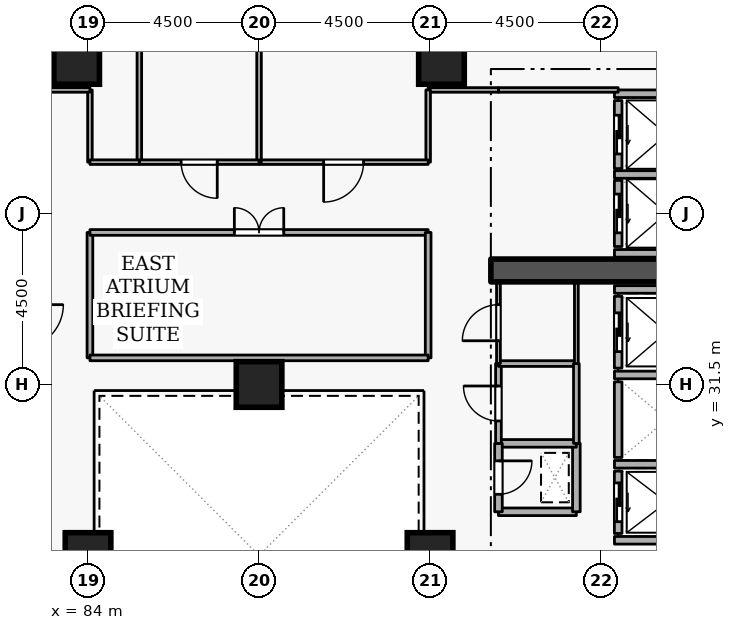
"""IFC4 building model, lengths in metres.
Left out: names, types, materials, properties, quantities, classifications, styles, units other than length and angle.
Written with IfcOpenShell. Run it as: python <this file> out.ifc"""

import sys

from ifc_helpers import new_model, si_unit, direction, frame, frame_2d, origin, origin_2d, place, context, subcontext, project, spatial, rectangle, extrude, element, fill, save


model = new_model("IFC4")
c1 = context("Model", 3, precision=1e-05, world=origin(), true_north=direction((0.0, 1.0)))
c2 = subcontext(c1, "Body", "Model", "MODEL_VIEW")
j1 = project(units=[si_unit("LENGTHUNIT", "METRE"), si_unit("PLANEANGLEUNIT", "RADIAN")], contexts=[c1])
p1 = place(None, origin())
s1 = spatial("IfcSite", under=j1, at=p1, CompositionType="ELEMENT")
p2 = place(p1, origin())
s2 = spatial("IfcBuilding", under=s1, at=p2, CompositionType="ELEMENT")
p3 = place(p2, frame((0.0, 0.0, 94.5)))
s3 = spatial("IfcBuildingStorey", under=s2, at=p3, CompositionType="ELEMENT", Elevation=94.5)
p4 = place(p3, frame((94.6, 34.5, 0.0), z_axis=(0.0, 0.0, 1.0), x_axis=(1.0, 0.0, 0.0)))
e1 = element("IfcWall", 1, at=p4, inside=s3, PredefinedType="SHEAR", context=c2, shape_type="SweptSolid", body=[
    extrude(rectangle(XDim=5.7, YDim=0.6, at=frame_2d((2.85, 0.0))), origin(), (0.0, 0.0, 1.0), 3.6),
])
for number, where, z_axis, x_axis in (
    (2, (93.3, 40.0, 0.0), (0.0, 0.0, 1.0), (1.0, 0.0, 0.0)),
    (3, (83.7, 40.0, 0.0), (0.0, 0.0, 1.0), (1.0, 0.0, 0.0)),
    (4, (93.0, 27.0, 0.0), (0.0, 0.0, 1.0), (1.0, 0.0, 0.0)),
    (5, (84.0, 27.0, 0.0), (0.0, 0.0, 1.0), (1.0, 0.0, 0.0)),
    (6, (88.5, 31.5, 0.0), (0.0, 0.0, 1.0), (1.0, 0.0, 0.0)),
):
    element("IfcColumn", number, at=place(p3, frame(where, z_axis=z_axis, x_axis=x_axis)), inside=s3, PredefinedType="COLUMN", context=c2, shape_type="SweptSolid", body=[
        extrude(rectangle(XDim=1.2, YDim=1.2, at=origin_2d()), origin(), (0.0, 0.0, 1.0), 3.6),
    ])
p5 = place(p3, frame((97.95, 29.22, 0.0), z_axis=(0.0, 0.0, 1.0), x_axis=(0.0, -1.0, 0.0)))
e7 = element("IfcWall", 7, at=p5, inside=s3, PredefinedType="STANDARD", context=c2, shape_type="SweptSolid", body=[
    extrude(rectangle(XDim=1.64, YDim=0.2, at=frame_2d((0.82, 0.0))), origin(), (0.0, 0.0, 1.0), 3.3),
])
p6 = place(p5, frame((0.31, 0.0, 0.0)))
e8 = element("IfcOpeningElement", 8, at=p6, cuts=e7, PredefinedType="OPENING", context=c2, shape_type="SweptSolid", body=[
    extrude(rectangle(XDim=1.02, YDim=2.06, at=frame_2d((0.51, 1.03))), frame((0.0, 0.11, 0.0), z_axis=(0.0, -1.0, 0.0), x_axis=(1.0, 0.0, 0.0)), (0.0, 0.0, 1.0), 0.22),
])
p7 = place(p3, frame((97.95, 31.57, 0.0), z_axis=(0.0, 0.0, 1.0), x_axis=(0.0, -1.0, 0.0)))
e9 = element("IfcWall", 9, at=p7, inside=s3, PredefinedType="STANDARD", context=c2, shape_type="SweptSolid", body=[
    extrude(rectangle(XDim=1.99, YDim=0.2, at=frame_2d((0.995, 0.0))), origin(), (0.0, 0.0, 1.0), 3.3),
])
p8 = place(p3, frame((97.95, 33.82, 0.0), z_axis=(0.0, 0.0, 1.0), x_axis=(0.0, -1.0, 0.0)))
e10 = element("IfcWall", 10, at=p8, inside=s3, PredefinedType="STANDARD", context=c2, shape_type="SweptSolid", body=[
    extrude(rectangle(XDim=1.89, YDim=0.2, at=frame_2d((0.945, 0.0))), origin(), (0.0, 0.0, 1.0), 3.3),
])
p9 = place(p8, frame((0.435, 0.0, 0.0)))
e11 = element("IfcOpeningElement", 11, at=p9, cuts=e10, PredefinedType="OPENING", context=c2, shape_type="SweptSolid", body=[
    extrude(rectangle(XDim=1.02, YDim=2.06, at=frame_2d((0.51, 1.03))), frame((0.0, 0.11, 0.0), z_axis=(0.0, -1.0, 0.0), x_axis=(1.0, 0.0, 0.0)), (0.0, 0.0, 1.0), 0.22),
])
p10 = place(p3, frame((97.95, 36.87, 0.0), z_axis=(0.0, 0.0, 1.0), x_axis=(0.0, -1.0, 0.0)))
e12 = element("IfcWall", 12, at=p10, inside=s3, PredefinedType="STANDARD", context=c2, shape_type="SweptSolid", body=[
    extrude(rectangle(XDim=1.74, YDim=0.2, at=frame_2d((0.87, 0.0))), origin(), (0.0, 0.0, 1.0), 3.3),
])
p11 = place(p10, frame((0.36, 0.0, 0.0)))
e13 = element("IfcOpeningElement", 13, at=p11, cuts=e12, PredefinedType="OPENING", context=c2, shape_type="SweptSolid", body=[
    extrude(rectangle(XDim=1.02, YDim=2.06, at=frame_2d((0.51, 1.03))), frame((0.0, 0.11, 0.0), z_axis=(0.0, -1.0, 0.0), x_axis=(1.0, 0.0, 0.0)), (0.0, 0.0, 1.0), 0.22),
])
p12 = place(p3, frame((97.95, 38.97, 0.0), z_axis=(0.0, 0.0, 1.0), x_axis=(0.0, -1.0, 0.0)))
e14 = element("IfcWall", 14, at=p12, inside=s3, PredefinedType="STANDARD", context=c2, shape_type="SweptSolid", body=[
    extrude(rectangle(XDim=1.79, YDim=0.2, at=frame_2d((0.895, 0.0))), origin(), (0.0, 0.0, 1.0), 3.3),
])
p13 = place(p12, frame((0.385, 0.0, 0.0)))
e15 = element("IfcOpeningElement", 15, at=p13, cuts=e14, PredefinedType="OPENING", context=c2, shape_type="SweptSolid", body=[
    extrude(rectangle(XDim=1.02, YDim=2.06, at=frame_2d((0.51, 1.03))), frame((0.0, 0.11, 0.0), z_axis=(0.0, -1.0, 0.0), x_axis=(1.0, 0.0, 0.0)), (0.0, 0.0, 1.0), 0.22),
])
for number, where, z_axis, x_axis in (
    (16, (97.852, 29.4, 0.0), (0.0, 0.0, 1.0), (1.0, 0.0, 0.0)),
    (17, (97.852, 27.4, 0.0), (0.0, 0.0, 1.0), (1.0, 0.0, 0.0)),
    (18, (97.852, 31.75, 0.0), (0.0, 0.0, 1.0), (1.0, 0.0, 0.0)),
    (19, (97.852, 34.0, 0.0), (0.0, 0.0, 1.0), (1.0, 0.0, 0.0)),
):
    element("IfcWall", number, at=place(p3, frame(where, z_axis=z_axis, x_axis=x_axis)), inside=s3, PredefinedType="STANDARD", context=c2, shape_type="SweptSolid", body=[
        extrude(rectangle(XDim=2.436, YDim=0.2, at=frame_2d((1.218, 0.0))), origin(), (0.0, 0.0, 1.0), 3.3),
    ])
for number, where, z_axis, x_axis in (
    (20, (97.852, 37.025, 0.0), (0.0, 0.0, 1.0), (1.0, 0.0, 0.0)),
    (21, (97.852, 34.95, 0.0), (0.0, 0.0, 1.0), (1.0, 0.0, 0.0)),
):
    element("IfcWall", number, at=place(p3, frame(where, z_axis=z_axis, x_axis=x_axis)), inside=s3, PredefinedType="STANDARD", context=c2, shape_type="SweptSolid", body=[
        extrude(rectangle(XDim=2.746, YDim=0.2, at=frame_2d((1.373, 0.0))), origin(), (0.0, 0.0, 1.0), 3.3),
    ])
p14 = place(p3, frame((97.852, 39.15, 0.0), z_axis=(0.0, 0.0, 1.0), x_axis=(1.0, 0.0, 0.0)))
e22 = element("IfcWall", 22, at=p14, inside=s3, PredefinedType="STANDARD", context=c2, shape_type="SweptSolid", body=[
    extrude(rectangle(XDim=2.636, YDim=0.2, at=frame_2d((1.318, 0.0))), origin(), (0.0, 0.0, 1.0), 3.3),
])
p15 = place(p3, frame((94.8, 28.15, 0.0), z_axis=(0.0, 0.0, 1.0), x_axis=(1.0, 0.0, 0.0)))
e23 = element("IfcWall", 23, at=p15, inside=s3, PredefinedType="STANDARD", context=c2, shape_type="SweptSolid", body=[
    extrude(rectangle(XDim=2.05, YDim=0.2, at=frame_2d((1.025, 0.0))), origin(), (0.0, 0.0, 1.0), 3.3),
])
p16 = place(p3, frame((96.85, 28.15, 0.0), z_axis=(0.0, 0.0, 1.0), x_axis=(0.0, 1.0, 0.0)))
e24 = element("IfcWall", 24, at=p16, inside=s3, PredefinedType="STANDARD", context=c2, shape_type="SweptSolid", body=[
    extrude(rectangle(XDim=1.8, YDim=0.2, at=frame_2d((0.9, 0.0))), origin(), (0.0, 0.0, 1.0), 3.3),
])
p17 = place(p3, frame((96.85, 29.95, 0.0), z_axis=(0.0, 0.0, 1.0), x_axis=(-1.0, 0.0, 0.0)))
e25 = element("IfcWall", 25, at=p17, inside=s3, PredefinedType="STANDARD", context=c2, shape_type="SweptSolid", body=[
    extrude(rectangle(XDim=2.05, YDim=0.2, at=frame_2d((1.025, 0.0))), origin(), (0.0, 0.0, 1.0), 3.3),
])
p18 = place(p3, frame((94.8, 29.95, 0.0), z_axis=(0.0, 0.0, 1.0), x_axis=(0.0, -1.0, 0.0)))
e26 = element("IfcWall", 26, at=p18, inside=s3, PredefinedType="STANDARD", context=c2, shape_type="SweptSolid", body=[
    extrude(rectangle(XDim=1.8, YDim=0.2, at=frame_2d((0.9, 0.0))), origin(), (0.0, 0.0, 1.0), 3.3),
])
p19 = place(p18, frame((0.46, 0.0, 0.0)))
e27 = element("IfcOpeningElement", 27, at=p19, cuts=e26, PredefinedType="OPENING", context=c2, shape_type="SweptSolid", body=[
    extrude(rectangle(XDim=0.88, YDim=2.04, at=frame_2d((0.44, 1.02))), frame((0.0, 0.11, 0.0), z_axis=(0.0, -1.0, 0.0), x_axis=(1.0, 0.0, 0.0)), (0.0, 0.0, 1.0), 0.22),
])
p20 = place(p3, frame((94.8, 29.95, 0.0), z_axis=(0.0, 0.0, 1.0), x_axis=(0.0, 1.0, 0.0)))
e28 = element("IfcWall", 28, at=p20, inside=s3, PredefinedType="PARTITIONING", context=c2, shape_type="SweptSolid", body=[
    extrude(rectangle(XDim=2.1, YDim=0.15, at=frame_2d((1.05, 0.0))), origin(), (0.0, 0.0, 1.0), 3.3),
])
p21 = place(p20, frame((0.59, 0.0, 0.0)))
e29 = element("IfcOpeningElement", 29, at=p21, cuts=e28, PredefinedType="OPENING", context=c2, shape_type="SweptSolid", body=[
    extrude(rectangle(XDim=0.92, YDim=2.08, at=frame_2d((0.46, 1.04))), frame((0.0, 0.085, 0.0), z_axis=(0.0, -1.0, 0.0), x_axis=(1.0, 0.0, 0.0)), (0.0, 0.0, 1.0), 0.17),
])
p22 = place(p3, frame((94.8, 32.05, 0.0), z_axis=(0.0, 0.0, 1.0), x_axis=(1.0, 0.0, 0.0)))
e30 = element("IfcWall", 30, at=p22, inside=s3, PredefinedType="PARTITIONING", context=c2, shape_type="SweptSolid", body=[
    extrude(rectangle(XDim=2.05, YDim=0.15, at=frame_2d((1.025, 0.0))), origin(), (0.0, 0.0, 1.0), 3.3),
])
p23 = place(p3, frame((96.85, 32.05, 0.0), z_axis=(0.0, 0.0, 1.0), x_axis=(0.0, -1.0, 0.0)))
e31 = element("IfcWall", 31, at=p23, inside=s3, PredefinedType="PARTITIONING", context=c2, shape_type="SweptSolid", body=[
    extrude(rectangle(XDim=2.1, YDim=0.15, at=frame_2d((1.05, 0.0))), origin(), (0.0, 0.0, 1.0), 3.3),
])
p24 = place(p3, frame((94.8, 32.05, 0.0), z_axis=(0.0, 0.0, 1.0), x_axis=(0.0, 1.0, 0.0)))
e32 = element("IfcWall", 32, at=p24, inside=s3, PredefinedType="PARTITIONING", context=c2, shape_type="SweptSolid", body=[
    extrude(rectangle(XDim=2.15, YDim=0.1, at=frame_2d((1.075, 0.0))), origin(), (0.0, 0.0, 1.0), 3.3),
])
p25 = place(p24, frame((0.6, 0.0, 0.0)))
e33 = element("IfcOpeningElement", 33, at=p25, cuts=e32, PredefinedType="OPENING", context=c2, shape_type="SweptSolid", body=[
    extrude(rectangle(XDim=0.95, YDim=2.1, at=frame_2d((0.475, 1.05))), frame((0.0, 0.06, 0.0), z_axis=(0.0, -1.0, 0.0), x_axis=(1.0, 0.0, 0.0)), (0.0, 0.0, 1.0), 0.12),
])
p26 = place(p3, frame((96.85, 34.2, 0.0), z_axis=(0.0, 0.0, 1.0), x_axis=(0.0, -1.0, 0.0)))
e34 = element("IfcWall", 34, at=p26, inside=s3, PredefinedType="PARTITIONING", context=c2, shape_type="SweptSolid", body=[
    extrude(rectangle(XDim=2.15, YDim=0.1, at=frame_2d((1.075, 0.0))), origin(), (0.0, 0.0, 1.0), 3.3),
])
p27 = place(p3, frame((97.95, 39.25, 0.0), z_axis=(0.0, 0.0, 1.0), x_axis=(-1.0, 0.0, 0.0)))
e35 = element("IfcWall", 35, at=p27, inside=s3, PredefinedType="PARTITIONING", context=c2, shape_type="SweptSolid", body=[
    extrude(rectangle(XDim=3.15, YDim=0.12, at=frame_2d((1.575, 0.0))), origin(), (0.0, 0.0, 1.0), 3.3),
])
p28 = place(p3, frame((94.8, 39.25, 0.0), z_axis=(0.0, 0.0, 1.0), x_axis=(-1.0, 0.0, 0.0)))
e36 = element("IfcWall", 36, at=p28, inside=s3, PredefinedType="PARTITIONING", context=c2, shape_type="SweptSolid", body=[
    extrude(rectangle(XDim=1.85, YDim=0.12, at=frame_2d((0.925, 0.0))), origin(), (0.0, 0.0, 1.0), 3.3),
])
p29 = place(p3, frame((92.95, 39.25, 0.0), z_axis=(0.0, 0.0, 1.0), x_axis=(0.0, -1.0, 0.0)))
e37 = element("IfcWall", 37, at=p29, inside=s3, PredefinedType="PARTITIONING", context=c2, shape_type="SweptSolid", body=[
    extrude(rectangle(XDim=1.9, YDim=0.12, at=frame_2d((0.95, 0.0))), origin(), (0.0, 0.0, 1.0), 3.3),
])
p30 = place(p3, frame((92.95, 37.35, 0.0), z_axis=(0.0, 0.0, 1.0), x_axis=(-1.0, 0.0, 0.0)))
e38 = element("IfcWall", 38, at=p30, inside=s3, PredefinedType="PARTITIONING", context=c2, shape_type="SweptSolid", body=[
    extrude(rectangle(XDim=4.45, YDim=0.12, at=frame_2d((2.225, 0.0))), origin(), (0.0, 0.0, 1.0), 3.3),
])
p31 = place(p30, frame((1.7, 0.0, 0.0)))
e39 = element("IfcOpeningElement", 39, at=p31, cuts=e38, PredefinedType="OPENING", context=c2, shape_type="SweptSolid", body=[
    extrude(rectangle(XDim=1.05, YDim=2.1, at=frame_2d((0.525, 1.05))), frame((0.0, 0.07, 0.0), z_axis=(0.0, -1.0, 0.0), x_axis=(1.0, 0.0, 0.0)), (0.0, 0.0, 1.0), 0.14),
])
p32 = place(p3, frame((88.5, 37.35, 0.0), z_axis=(0.0, 0.0, 1.0), x_axis=(0.0, 1.0, 0.0)))
e40 = element("IfcWall", 40, at=p32, inside=s3, PredefinedType="PARTITIONING", context=c2, shape_type="SweptSolid", body=[
    extrude(rectangle(XDim=13.57, YDim=0.12, at=frame_2d((6.785, 0.0))), origin(), (0.0, 0.0, 1.0), 2.892),
])
p33 = place(p3, frame((85.35, 37.35, 0.0), z_axis=(0.0, 0.0, 1.0), x_axis=(0.0, 1.0, 0.0)))
e41 = element("IfcWall", 41, at=p33, inside=s3, PredefinedType="PARTITIONING", context=c2, shape_type="SweptSolid", body=[
    extrude(rectangle(XDim=13.57, YDim=0.12, at=frame_2d((6.785, 0.0))), origin(), (0.0, 0.0, 1.0), 3.3),
])
p34 = place(p3, frame((88.5, 37.35, 0.0), z_axis=(0.0, 0.0, 1.0), x_axis=(-1.0, 0.0, 0.0)))
e42 = element("IfcWall", 42, at=p34, inside=s3, PredefinedType="PARTITIONING", context=c2, shape_type="SweptSolid", body=[
    extrude(rectangle(XDim=3.15, YDim=0.12, at=frame_2d((1.575, 0.0))), origin(), (0.0, 0.0, 1.0), 3.3),
])
p35 = place(p34, frame((1.1, 0.0, 0.0)))
e43 = element("IfcOpeningElement", 43, at=p35, cuts=e42, PredefinedType="OPENING", context=c2, shape_type="SweptSolid", body=[
    extrude(rectangle(XDim=0.95, YDim=2.1, at=frame_2d((0.475, 1.05))), frame((0.0, 0.07, 0.0), z_axis=(0.0, -1.0, 0.0), x_axis=(1.0, 0.0, 0.0)), (0.0, 0.0, 1.0), 0.14),
])
p36 = place(p3, frame((84.05, 37.35, 0.0), z_axis=(0.0, 0.0, 1.0), x_axis=(0.0, 1.0, 0.0)))
e44 = element("IfcWall", 44, at=p36, inside=s3, PredefinedType="PARTITIONING", context=c2, shape_type="SweptSolid", body=[
    extrude(rectangle(XDim=1.9, YDim=0.12, at=frame_2d((0.95, 0.0))), origin(), (0.0, 0.0, 1.0), 3.3),
])
p37 = place(p3, frame((84.05, 39.25, 0.0), z_axis=(0.0, 0.0, 1.0), x_axis=(-1.0, 0.0, 0.0)))
e45 = element("IfcWall", 45, at=p37, inside=s3, PredefinedType="PARTITIONING", context=c2, shape_type="SweptSolid", body=[
    extrude(rectangle(XDim=1.85, YDim=0.12, at=frame_2d((0.925, 0.0))), origin(), (0.0, 0.0, 1.0), 3.3),
])
p38 = place(p3, frame((85.35, 37.35, 0.0), z_axis=(0.0, 0.0, 1.0), x_axis=(-1.0, 0.0, 0.0)))
e46 = element("IfcWall", 46, at=p38, inside=s3, PredefinedType="PARTITIONING", context=c2, shape_type="SweptSolid", body=[
    extrude(rectangle(XDim=1.3, YDim=0.12, at=frame_2d((0.65, 0.0))), origin(), (0.0, 0.0, 1.0), 3.3),
])
p39 = place(p3, frame((84.05, 32.2, 0.0), z_axis=(0.0, 0.0, 1.0), x_axis=(0.0, 1.0, 0.0)))
e47 = element("IfcWall", 47, at=p39, inside=s3, PredefinedType="PARTITIONING", context=c2, shape_type="SweptSolid", body=[
    extrude(rectangle(XDim=3.3, YDim=0.15, at=frame_2d((1.65, 0.0))), origin(), (0.0, 0.0, 1.0), 3.3),
])
p40 = place(p3, frame((84.05, 35.5, 0.0), z_axis=(0.0, 0.0, 1.0), x_axis=(1.0, 0.0, 0.0)))
e48 = element("IfcWall", 48, at=p40, inside=s3, PredefinedType="PARTITIONING", context=c2, shape_type="SweptSolid", body=[
    extrude(rectangle(XDim=8.9, YDim=0.15, at=frame_2d((4.45, 0.0))), origin(), (0.0, 0.0, 1.0), 3.3),
])
p41 = place(p40, frame((3.8, 0.0, 0.0)))
e49 = element("IfcOpeningElement", 49, at=p41, cuts=e48, PredefinedType="OPENING", context=c2, shape_type="SweptSolid", body=[
    extrude(rectangle(XDim=1.3, YDim=2.12, at=frame_2d((0.65, 1.06))), frame((0.0, 0.085, 0.0), z_axis=(0.0, -1.0, 0.0), x_axis=(1.0, 0.0, 0.0)), (0.0, 0.0, 1.0), 0.17),
])
p42 = place(p3, frame((92.95, 35.5, 0.0), z_axis=(0.0, 0.0, 1.0), x_axis=(0.0, -1.0, 0.0)))
e50 = element("IfcWall", 50, at=p42, inside=s3, PredefinedType="PARTITIONING", context=c2, shape_type="SweptSolid", body=[
    extrude(rectangle(XDim=3.3, YDim=0.15, at=frame_2d((1.65, 0.0))), origin(), (0.0, 0.0, 1.0), 3.3),
])
p43 = place(p3, frame((92.95, 32.2, 0.0), z_axis=(0.0, 0.0, 1.0), x_axis=(-1.0, 0.0, 0.0)))
e51 = element("IfcWall", 51, at=p43, inside=s3, PredefinedType="PARTITIONING", context=c2, shape_type="SweptSolid", body=[
    extrude(rectangle(XDim=8.9, YDim=0.15, at=frame_2d((4.45, 0.0))), origin(), (0.0, 0.0, 1.0), 3.3),
])
p44 = place(p6, origin())
e52 = element("IfcDoor", 52, at=p44, inside=s3, OperationType="SLIDING_TO_LEFT", PredefinedType="DOOR", context=c2, shape_type="SweptSolid", body=[
    extrude(rectangle(XDim=1.02, YDim=2.06, at=frame_2d((0.51, 1.03))), frame((0.0, 0.025, 0.0), z_axis=(0.0, -1.0, 0.0), x_axis=(1.0, 0.0, 0.0)), (0.0, 0.0, 1.0), 0.05),
])
fill(e8, e52)
p45 = place(p9, origin())
e53 = element("IfcDoor", 53, at=p45, inside=s3, OperationType="SLIDING_TO_LEFT", PredefinedType="DOOR", context=c2, shape_type="SweptSolid", body=[
    extrude(rectangle(XDim=1.02, YDim=2.06, at=frame_2d((0.51, 1.03))), frame((0.0, 0.025, 0.0), z_axis=(0.0, -1.0, 0.0), x_axis=(1.0, 0.0, 0.0)), (0.0, 0.0, 1.0), 0.05),
])
fill(e11, e53)
p46 = place(p11, origin())
e54 = element("IfcDoor", 54, at=p46, inside=s3, OperationType="SLIDING_TO_LEFT", PredefinedType="DOOR", context=c2, shape_type="SweptSolid", body=[
    extrude(rectangle(XDim=1.02, YDim=2.06, at=frame_2d((0.51, 1.03))), frame((0.0, 0.025, 0.0), z_axis=(0.0, -1.0, 0.0), x_axis=(1.0, 0.0, 0.0)), (0.0, 0.0, 1.0), 0.05),
])
fill(e13, e54)
p47 = place(p13, origin())
e55 = element("IfcDoor", 55, at=p47, inside=s3, OperationType="SLIDING_TO_LEFT", PredefinedType="DOOR", context=c2, shape_type="SweptSolid", body=[
    extrude(rectangle(XDim=1.02, YDim=2.06, at=frame_2d((0.51, 1.03))), frame((0.0, 0.025, 0.0), z_axis=(0.0, -1.0, 0.0), x_axis=(1.0, 0.0, 0.0)), (0.0, 0.0, 1.0), 0.05),
])
fill(e15, e55)
p48 = place(p19, origin())
e56 = element("IfcDoor", 56, at=p48, inside=s3, OperationType="SINGLE_SWING_LEFT", PredefinedType="DOOR", context=c2, shape_type="SweptSolid", body=[
    extrude(rectangle(XDim=0.88, YDim=2.04, at=frame_2d((0.44, 1.02))), frame((0.0, 0.025, 0.0), z_axis=(0.0, -1.0, 0.0), x_axis=(1.0, 0.0, 0.0)), (0.0, 0.0, 1.0), 0.05),
])
fill(e27, e56)
p49 = place(p21, origin())
e57 = element("IfcDoor", 57, at=p49, inside=s3, OperationType="SINGLE_SWING_RIGHT", PredefinedType="DOOR", context=c2, shape_type="SweptSolid", body=[
    extrude(rectangle(XDim=0.92, YDim=2.08, at=frame_2d((0.46, 1.04))), frame((0.0, 0.025, 0.0), z_axis=(0.0, -1.0, 0.0), x_axis=(1.0, 0.0, 0.0)), (0.0, 0.0, 1.0), 0.05),
])
fill(e29, e57)
p50 = place(p25, origin())
e58 = element("IfcDoor", 58, at=p50, inside=s3, OperationType="SINGLE_SWING_LEFT", PredefinedType="DOOR", context=c2, shape_type="SweptSolid", body=[
    extrude(rectangle(XDim=0.95, YDim=2.1, at=frame_2d((0.475, 1.05))), frame((0.0, 0.025, 0.0), z_axis=(0.0, -1.0, 0.0), x_axis=(1.0, 0.0, 0.0)), (0.0, 0.0, 1.0), 0.05),
])
fill(e33, e58)
p51 = place(p31, origin())
e59 = element("IfcDoor", 59, at=p51, inside=s3, OperationType="SINGLE_SWING_RIGHT", PredefinedType="DOOR", context=c2, shape_type="SweptSolid", body=[
    extrude(rectangle(XDim=1.05, YDim=2.1, at=frame_2d((0.525, 1.05))), frame((0.0, 0.025, 0.0), z_axis=(0.0, -1.0, 0.0), x_axis=(1.0, 0.0, 0.0)), (0.0, 0.0, 1.0), 0.05),
])
fill(e39, e59)
p52 = place(p35, origin())
e60 = element("IfcDoor", 60, at=p52, inside=s3, OperationType="SINGLE_SWING_LEFT", PredefinedType="DOOR", context=c2, shape_type="SweptSolid", body=[
    extrude(rectangle(XDim=0.95, YDim=2.1, at=frame_2d((0.475, 1.05))), frame((0.0, 0.025, 0.0), z_axis=(0.0, -1.0, 0.0), x_axis=(1.0, 0.0, 0.0)), (0.0, 0.0, 1.0), 0.05),
])
fill(e43, e60)
p53 = place(p41, origin())
e61 = element("IfcDoor", 61, at=p53, inside=s3, OperationType="DOUBLE_DOOR_SINGLE_SWING", PredefinedType="DOOR", context=c2, shape_type="SweptSolid", body=[
    extrude(rectangle(XDim=1.3, YDim=2.12, at=frame_2d((0.65, 1.06))), frame((0.0, 0.025, 0.0), z_axis=(0.0, -1.0, 0.0), x_axis=(1.0, 0.0, 0.0)), (0.0, 0.0, 1.0), 0.05),
])
fill(e49, e61)
save(model, sys.argv[1])
